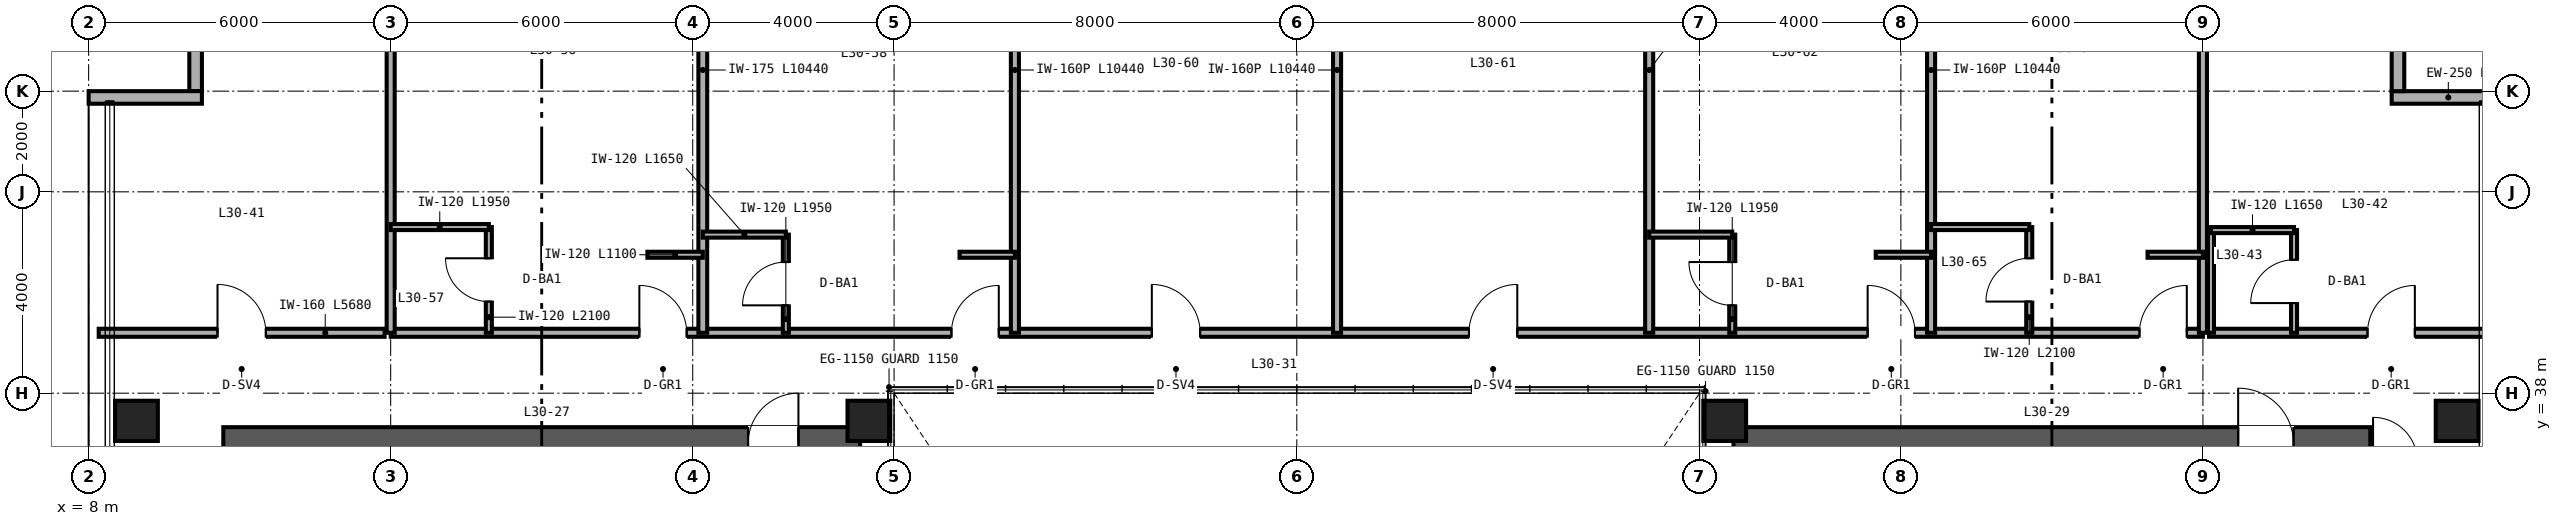
"""IFC4 building model, lengths in metres.
Left out: names, types, materials, properties, quantities, classifications, styles, units other than length and angle.
Written with IfcOpenShell. Run it as: python <this file> out.ifc"""

import sys

from ifc_helpers import new_model, si_unit, direction, frame, frame_2d, origin, origin_2d, place, context, subcontext, project, spatial, rectangle, hollow_rectangle, extrude, source, transform, mapped, element, fill, save


model = new_model("IFC4")
c1 = context("Model", 3, precision=1e-05, world=origin(), true_north=direction((0.0, 1.0)))
c2 = subcontext(c1, "Body", "Model", "MODEL_VIEW")
j1 = project(units=[si_unit("LENGTHUNIT", "METRE"), si_unit("PLANEANGLEUNIT", "RADIAN")], contexts=[c1])
p1 = place(None, origin())
s1 = spatial("IfcSite", under=j1, at=p1, CompositionType="ELEMENT")
p2 = place(p1, origin())
s2 = spatial("IfcBuilding", under=s1, at=p2, CompositionType="ELEMENT")
p3 = place(p2, frame((0.0, 0.0, 122.4)))
s3 = spatial("IfcBuildingStorey", under=s2, at=p3, CompositionType="ELEMENT", Elevation=122.4)
p4 = place(p3, frame((10.675, 37.0, 0.0), z_axis=(0.0, 0.0, 1.0), x_axis=(1.0, 0.0, 0.0)))
e1 = element("IfcWall", 1, at=p4, inside=s3, PredefinedType="SHEAR", context=c2, shape_type="SweptSolid", body=[
    extrude(rectangle(XDim=12.65, YDim=0.65, at=frame_2d((6.325, 0.0))), origin(), (0.0, 0.0, 1.0), 3.36),
])
p5 = place(p4, frame((10.425, 0.0, 0.0)))
e2 = element("IfcOpeningElement", 2, at=p5, cuts=e1, PredefinedType="OPENING", context=c2, shape_type="SweptSolid", body=[
    extrude(rectangle(XDim=1.0, YDim=2.15, at=frame_2d((0.5, 1.075))), frame((0.0, 0.335, 0.0), z_axis=(0.0, -1.0, 0.0), x_axis=(1.0, 0.0, 0.0)), (0.0, 0.0, 1.0), 0.67),
])
p6 = place(p3, frame((40.675, 37.0, 0.0), z_axis=(0.0, 0.0, 1.0), x_axis=(1.0, 0.0, 0.0)))
e3 = element("IfcWall", 3, at=p6, inside=s3, PredefinedType="SHEAR", context=c2, shape_type="SweptSolid", body=[
    extrude(rectangle(XDim=12.65, YDim=0.65, at=frame_2d((6.325, 0.0))), origin(), (0.0, 0.0, 1.0), 3.36),
])
p7 = place(p6, frame((10.025, 0.0, 0.0)))
e4 = element("IfcOpeningElement", 4, at=p7, cuts=e3, PredefinedType="OPENING", context=c2, shape_type="SweptSolid", body=[
    extrude(rectangle(XDim=1.1, YDim=2.15, at=frame_2d((0.55, 1.075))), frame((0.0, 0.335, 0.0), z_axis=(0.0, -1.0, 0.0), x_axis=(1.0, 0.0, 0.0)), (0.0, 0.0, 1.0), 0.67),
])
m1 = source(origin(), c2, "Body", "SweptSolid", [
    extrude(hollow_rectangle(XDim=0.85, YDim=0.8, WallThickness=0.032, at=origin_2d()), origin(), (0.0, 0.0, 1.0), 3.36),
])
for number, where, z_axis, x_axis in (
    (5, (8.95, 37.45, 0.0), (0.0, 0.0, 1.0), (1.0, 0.0, 0.0)),
    (6, (23.5, 37.45, 0.0), (0.0, 0.0, 1.0), (1.0, 0.0, 0.0)),
    (7, (40.5, 37.45, 0.0), (0.0, 0.0, 1.0), (1.0, 0.0, 0.0)),
    (8, (55.05, 37.45, 0.0), (0.0, 0.0, 1.0), (1.0, 0.0, 0.0)),
):
    element("IfcColumn", number, at=place(p3, frame(where, z_axis=z_axis, x_axis=x_axis)), inside=s3, PredefinedType="COLUMN", context=c2, shape_type="MappedRepresentation", body=[
        mapped(m1, transform((0.0, 0.0, 0.0), scale=1.0)),
    ])
p8 = place(p3, frame((56.0, 43.875, 0.0), z_axis=(0.0, 0.0, 1.0), x_axis=(-1.0, 0.0, 0.0)))
e9 = element("IfcWall", 9, at=p8, inside=s3, PredefinedType="SOLIDWALL", context=c2, shape_type="SweptSolid", body=[
    extrude(rectangle(XDim=2.25, YDim=0.25, at=frame_2d((1.125, 0.0))), origin(), (0.0, 0.0, 1.0), 3.36),
])
for number, where, z_axis, x_axis in (
    (10, (53.875, 44.0, 0.0), (0.0, 0.0, 1.0), (0.0, 1.0, 0.0)),
    (11, (10.125, 46.0, 0.0), (0.0, 0.0, 1.0), (0.0, -1.0, 0.0)),
):
    element("IfcWall", number, at=place(p3, frame(where, z_axis=z_axis, x_axis=x_axis)), inside=s3, PredefinedType="SOLIDWALL", context=c2, shape_type="SweptSolid", body=[
        extrude(rectangle(XDim=2.0, YDim=0.25, at=frame_2d((1.0, 0.0))), origin(), (0.0, 0.0, 1.0), 3.36),
    ])
p9 = place(p3, frame((10.25, 43.875, 0.0), z_axis=(0.0, 0.0, 1.0), x_axis=(-1.0, 0.0, 0.0)))
e12 = element("IfcWall", 12, at=p9, inside=s3, PredefinedType="SOLIDWALL", context=c2, shape_type="SweptSolid", body=[
    extrude(rectangle(XDim=2.25, YDim=0.25, at=frame_2d((1.125, 0.0))), origin(), (0.0, 0.0, 1.0), 3.36),
])
p10 = place(p3, frame((8.2, 39.2, 0.0), z_axis=(0.0, 0.0, 1.0), x_axis=(1.0, 0.0, 0.0)))
e13 = element("IfcWall", 13, at=p10, inside=s3, PredefinedType="PARTITIONING", context=c2, shape_type="SweptSolid", body=[
    extrude(rectangle(XDim=5.68, YDim=0.16, at=frame_2d((2.84, 0.0))), origin(), (0.0, 0.0, 1.0), 3.36),
])
p11 = place(p10, frame((2.36, 0.0, 0.0)))
e14 = element("IfcOpeningElement", 14, at=p11, cuts=e13, PredefinedType="OPENING", context=c2, shape_type="SweptSolid", body=[
    extrude(rectangle(XDim=0.96, YDim=2.15, at=frame_2d((0.48, 1.075))), frame((0.0, 0.09, 0.0), z_axis=(0.0, -1.0, 0.0), x_axis=(1.0, 0.0, 0.0)), (0.0, 0.0, 1.0), 0.18),
])
p12 = place(p3, frame((50.12, 39.2, 0.0), z_axis=(0.0, 0.0, 1.0), x_axis=(1.0, 0.0, 0.0)))
e15 = element("IfcWall", 15, at=p12, inside=s3, PredefinedType="PARTITIONING", context=c2, shape_type="SweptSolid", body=[
    extrude(rectangle(XDim=5.68, YDim=0.16, at=frame_2d((2.84, 0.0))), origin(), (0.0, 0.0, 1.0), 3.36),
])
p13 = place(p12, frame((3.15, 0.0, 0.0)))
e16 = element("IfcOpeningElement", 16, at=p13, cuts=e15, PredefinedType="OPENING", context=c2, shape_type="SweptSolid", body=[
    extrude(rectangle(XDim=0.94, YDim=2.15, at=frame_2d((0.47, 1.075))), frame((0.0, 0.09, 0.0), z_axis=(0.0, -1.0, 0.0), x_axis=(1.0, 0.0, 0.0)), (0.0, 0.0, 1.0), 0.18),
])
p14 = place(p3, frame((51.81, 39.2, 0.0), z_axis=(0.0, 0.0, 1.0), x_axis=(0.0, 1.0, 0.0)))
e17 = element("IfcWall", 17, at=p14, inside=s3, PredefinedType="PARTITIONING", context=c2, shape_type="SweptSolid", body=[
    extrude(rectangle(XDim=2.04, YDim=0.12, at=frame_2d((1.02, 0.0))), origin(), (0.0, 0.0, 1.0), 3.36),
])
p15 = place(p14, frame((0.59, 0.0, 0.0)))
e18 = element("IfcOpeningElement", 18, at=p15, cuts=e17, PredefinedType="OPENING", context=c2, shape_type="SweptSolid", body=[
    extrude(rectangle(XDim=0.86, YDim=2.1, at=frame_2d((0.43, 1.05))), frame((0.0, 0.07, 0.0), z_axis=(0.0, -1.0, 0.0), x_axis=(1.0, 0.0, 0.0)), (0.0, 0.0, 1.0), 0.14),
])
p16 = place(p3, frame((50.16, 39.2, 0.0), z_axis=(0.0, 0.0, 1.0), x_axis=(0.0, 1.0, 0.0)))
e19 = element("IfcWall", 19, at=p16, inside=s3, PredefinedType="PARTITIONING", context=c2, shape_type="SweptSolid", body=[
    extrude(rectangle(XDim=2.04, YDim=0.12, at=frame_2d((1.02, 0.0))), origin(), (0.0, 0.0, 1.0), 3.36),
])
p17 = place(p3, frame((50.16, 41.24, 0.0), z_axis=(0.0, 0.0, 1.0), x_axis=(1.0, 0.0, 0.0)))
e20 = element("IfcWall", 20, at=p17, inside=s3, PredefinedType="PARTITIONING", context=c2, shape_type="SweptSolid", body=[
    extrude(rectangle(XDim=1.65, YDim=0.12, at=frame_2d((0.825, 0.0))), origin(), (0.0, 0.0, 1.0), 3.36),
])
p18 = place(p3, frame((14.0, 39.2, 0.0), z_axis=(0.0, 0.0, 1.0), x_axis=(1.0, 0.0, 0.0)))
e21 = element("IfcWall", 21, at=p18, inside=s3, PredefinedType="PARTITIONING", context=c2, shape_type="SweptSolid", body=[
    extrude(rectangle(XDim=36.0, YDim=0.16, at=frame_2d((18.0, 0.0))), origin(), (0.0, 0.0, 1.0), 2.581),
])
p19 = place(p18, frame((4.94, 0.0, 0.0)))
e22 = element("IfcOpeningElement", 22, at=p19, cuts=e21, PredefinedType="OPENING", context=c2, shape_type="SweptSolid", body=[
    extrude(rectangle(XDim=0.94, YDim=2.15, at=frame_2d((0.47, 1.075))), frame((0.0, 0.09, 0.0), z_axis=(0.0, -1.0, 0.0), x_axis=(1.0, 0.0, 0.0)), (0.0, 0.0, 1.0), 0.18),
])
p20 = place(p18, frame((11.14, 0.0, 0.0)))
e23 = element("IfcOpeningElement", 23, at=p20, cuts=e21, PredefinedType="OPENING", context=c2, shape_type="SweptSolid", body=[
    extrude(rectangle(XDim=0.94, YDim=2.15, at=frame_2d((0.47, 1.075))), frame((0.0, 0.09, 0.0), z_axis=(0.0, -1.0, 0.0), x_axis=(1.0, 0.0, 0.0)), (0.0, 0.0, 1.0), 0.18),
])
p21 = place(p18, frame((15.12, 0.0, 0.0)))
e24 = element("IfcOpeningElement", 24, at=p21, cuts=e21, PredefinedType="OPENING", context=c2, shape_type="SweptSolid", body=[
    extrude(rectangle(XDim=0.96, YDim=2.15, at=frame_2d((0.48, 1.075))), frame((0.0, 0.09, 0.0), z_axis=(0.0, -1.0, 0.0), x_axis=(1.0, 0.0, 0.0)), (0.0, 0.0, 1.0), 0.18),
])
p22 = place(p18, frame((21.42, 0.0, 0.0)))
e25 = element("IfcOpeningElement", 25, at=p22, cuts=e21, PredefinedType="OPENING", context=c2, shape_type="SweptSolid", body=[
    extrude(rectangle(XDim=0.96, YDim=2.15, at=frame_2d((0.48, 1.075))), frame((0.0, 0.09, 0.0), z_axis=(0.0, -1.0, 0.0), x_axis=(1.0, 0.0, 0.0)), (0.0, 0.0, 1.0), 0.18),
])
p23 = place(p18, frame((29.34, 0.0, 0.0)))
e26 = element("IfcOpeningElement", 26, at=p23, cuts=e21, PredefinedType="OPENING", context=c2, shape_type="SweptSolid", body=[
    extrude(rectangle(XDim=0.94, YDim=2.15, at=frame_2d((0.47, 1.075))), frame((0.0, 0.09, 0.0), z_axis=(0.0, -1.0, 0.0), x_axis=(1.0, 0.0, 0.0)), (0.0, 0.0, 1.0), 0.18),
])
p24 = place(p18, frame((34.74, 0.0, 0.0)))
e27 = element("IfcOpeningElement", 27, at=p24, cuts=e21, PredefinedType="OPENING", context=c2, shape_type="SweptSolid", body=[
    extrude(rectangle(XDim=0.94, YDim=2.15, at=frame_2d((0.47, 1.075))), frame((0.0, 0.09, 0.0), z_axis=(0.0, -1.0, 0.0), x_axis=(1.0, 0.0, 0.0)), (0.0, 0.0, 1.0), 0.18),
])
for number, where, z_axis, x_axis in (
    (28, (14.0, 39.2, 0.0), (0.0, 0.0, 1.0), (0.0, 1.0, 0.0)),
    (29, (50.0, 39.2, 0.0), (0.0, 0.0, 1.0), (0.0, 1.0, 0.0)),
):
    element("IfcWall", number, at=place(p3, frame(where, z_axis=z_axis, x_axis=x_axis)), inside=s3, PredefinedType="PARTITIONING", context=c2, shape_type="SweptSolid", body=[
        extrude(rectangle(XDim=10.44, YDim=0.16, at=frame_2d((5.22, 0.0))), origin(), (0.0, 0.0, 1.0), 2.667),
    ])
p25 = place(p3, frame((20.2, 39.2, 0.0), z_axis=(0.0, 0.0, 1.0), x_axis=(0.0, 1.0, 0.0)))
e30 = element("IfcWall", 30, at=p25, inside=s3, PredefinedType="PARTITIONING", context=c2, shape_type="SweptSolid", body=[
    extrude(rectangle(XDim=10.44, YDim=0.175, at=frame_2d((5.22, 0.0))), origin(), (0.0, 0.0, 1.0), 2.667),
])
p26 = place(p3, frame((15.95, 39.2, 0.0), z_axis=(0.0, 0.0, 1.0), x_axis=(0.0, 1.0, 0.0)))
e31 = element("IfcWall", 31, at=p26, inside=s3, PredefinedType="PARTITIONING", context=c2, shape_type="SweptSolid", body=[
    extrude(rectangle(XDim=2.1, YDim=0.12, at=frame_2d((1.05, 0.0))), origin(), (0.0, 0.0, 1.0), 3.36),
])
p27 = place(p26, frame((0.62, 0.0, 0.0)))
e32 = element("IfcOpeningElement", 32, at=p27, cuts=e31, PredefinedType="OPENING", context=c2, shape_type="SweptSolid", body=[
    extrude(rectangle(XDim=0.86, YDim=2.1, at=frame_2d((0.43, 1.05))), frame((0.0, 0.07, 0.0), z_axis=(0.0, -1.0, 0.0), x_axis=(1.0, 0.0, 0.0)), (0.0, 0.0, 1.0), 0.14),
])
p28 = place(p3, frame((14.0, 41.3, 0.0), z_axis=(0.0, 0.0, 1.0), x_axis=(1.0, 0.0, 0.0)))
e33 = element("IfcWall", 33, at=p28, inside=s3, PredefinedType="PARTITIONING", context=c2, shape_type="SweptSolid", body=[
    extrude(rectangle(XDim=1.95, YDim=0.12, at=frame_2d((0.975, 0.0))), origin(), (0.0, 0.0, 1.0), 3.36),
])
p29 = place(p3, frame((19.1, 40.75, 0.0), z_axis=(0.0, 0.0, 1.0), x_axis=(1.0, 0.0, 0.0)))
e34 = element("IfcWall", 34, at=p29, inside=s3, PredefinedType="PARTITIONING", context=c2, shape_type="SweptSolid", body=[
    extrude(rectangle(XDim=1.1, YDim=0.12, at=frame_2d((0.55, 0.0))), origin(), (0.0, 0.0, 1.0), 3.36),
])
p30 = place(p3, frame((26.4, 39.2, 0.0), z_axis=(0.0, 0.0, 1.0), x_axis=(0.0, 1.0, 0.0)))
e35 = element("IfcWall", 35, at=p30, inside=s3, PredefinedType="PARTITIONING", context=c2, shape_type="SweptSolid", body=[
    extrude(rectangle(XDim=10.44, YDim=0.16, at=frame_2d((5.22, 0.0))), origin(), (0.0, 0.0, 1.0), 2.433),
])
p31 = place(p3, frame((21.85, 39.2, 0.0), z_axis=(0.0, 0.0, 1.0), x_axis=(0.0, 1.0, 0.0)))
e36 = element("IfcWall", 36, at=p31, inside=s3, PredefinedType="PARTITIONING", context=c2, shape_type="SweptSolid", body=[
    extrude(rectangle(XDim=1.95, YDim=0.12, at=frame_2d((0.975, 0.0))), origin(), (0.0, 0.0, 1.0), 3.36),
])
p32 = place(p31, frame((0.545, 0.0, 0.0)))
e37 = element("IfcOpeningElement", 37, at=p32, cuts=e36, PredefinedType="OPENING", context=c2, shape_type="SweptSolid", body=[
    extrude(rectangle(XDim=0.86, YDim=2.1, at=frame_2d((0.43, 1.05))), frame((0.0, 0.07, 0.0), z_axis=(0.0, -1.0, 0.0), x_axis=(1.0, 0.0, 0.0)), (0.0, 0.0, 1.0), 0.14),
])
p33 = place(p3, frame((20.2, 41.15, 0.0), z_axis=(0.0, 0.0, 1.0), x_axis=(1.0, 0.0, 0.0)))
e38 = element("IfcWall", 38, at=p33, inside=s3, PredefinedType="PARTITIONING", context=c2, shape_type="SweptSolid", body=[
    extrude(rectangle(XDim=1.65, YDim=0.12, at=frame_2d((0.825, 0.0))), origin(), (0.0, 0.0, 1.0), 3.36),
])
p34 = place(p3, frame((25.3, 40.75, 0.0), z_axis=(0.0, 0.0, 1.0), x_axis=(1.0, 0.0, 0.0)))
e39 = element("IfcWall", 39, at=p34, inside=s3, PredefinedType="PARTITIONING", context=c2, shape_type="SweptSolid", body=[
    extrude(rectangle(XDim=1.1, YDim=0.12, at=frame_2d((0.55, 0.0))), origin(), (0.0, 0.0, 1.0), 3.36),
])
for number, where, z_axis, x_axis in (
    (40, (32.8, 39.2, 0.0), (0.0, 0.0, 1.0), (0.0, 1.0, 0.0)),
    (41, (39.0, 39.2, 0.0), (0.0, 0.0, 1.0), (0.0, 1.0, 0.0)),
):
    element("IfcWall", number, at=place(p3, frame(where, z_axis=z_axis, x_axis=x_axis)), inside=s3, PredefinedType="PARTITIONING", context=c2, shape_type="SweptSolid", body=[
        extrude(rectangle(XDim=10.44, YDim=0.16, at=frame_2d((5.22, 0.0))), origin(), (0.0, 0.0, 1.0), 2.433),
    ])
p35 = place(p3, frame((44.6, 39.2, 0.0), z_axis=(0.0, 0.0, 1.0), x_axis=(0.0, 1.0, 0.0)))
e42 = element("IfcWall", 42, at=p35, inside=s3, PredefinedType="PARTITIONING", context=c2, shape_type="SweptSolid", body=[
    extrude(rectangle(XDim=10.44, YDim=0.16, at=frame_2d((5.22, 0.0))), origin(), (0.0, 0.0, 1.0), 2.667),
])
p36 = place(p3, frame((40.65, 39.2, 0.0), z_axis=(0.0, 0.0, 1.0), x_axis=(0.0, 1.0, 0.0)))
e43 = element("IfcWall", 43, at=p36, inside=s3, PredefinedType="PARTITIONING", context=c2, shape_type="SweptSolid", body=[
    extrude(rectangle(XDim=1.95, YDim=0.12, at=frame_2d((0.975, 0.0))), origin(), (0.0, 0.0, 1.0), 2.581),
])
p37 = place(p36, frame((0.545, 0.0, 0.0)))
e44 = element("IfcOpeningElement", 44, at=p37, cuts=e43, PredefinedType="OPENING", context=c2, shape_type="SweptSolid", body=[
    extrude(rectangle(XDim=0.86, YDim=2.1, at=frame_2d((0.43, 1.05))), frame((0.0, 0.07, 0.0), z_axis=(0.0, -1.0, 0.0), x_axis=(1.0, 0.0, 0.0)), (0.0, 0.0, 1.0), 0.14),
])
p38 = place(p3, frame((39.0, 41.15, 0.0), z_axis=(0.0, 0.0, 1.0), x_axis=(1.0, 0.0, 0.0)))
e45 = element("IfcWall", 45, at=p38, inside=s3, PredefinedType="PARTITIONING", context=c2, shape_type="SweptSolid", body=[
    extrude(rectangle(XDim=1.65, YDim=0.12, at=frame_2d((0.825, 0.0))), origin(), (0.0, 0.0, 1.0), 2.581),
])
p39 = place(p3, frame((43.5, 40.75, 0.0), z_axis=(0.0, 0.0, 1.0), x_axis=(1.0, 0.0, 0.0)))
e46 = element("IfcWall", 46, at=p39, inside=s3, PredefinedType="PARTITIONING", context=c2, shape_type="SweptSolid", body=[
    extrude(rectangle(XDim=1.1, YDim=0.12, at=frame_2d((0.55, 0.0))), origin(), (0.0, 0.0, 1.0), 3.36),
])
p40 = place(p3, frame((46.55, 39.2, 0.0), z_axis=(0.0, 0.0, 1.0), x_axis=(0.0, 1.0, 0.0)))
e47 = element("IfcWall", 47, at=p40, inside=s3, PredefinedType="PARTITIONING", context=c2, shape_type="SweptSolid", body=[
    extrude(rectangle(XDim=2.1, YDim=0.12, at=frame_2d((1.05, 0.0))), origin(), (0.0, 0.0, 1.0), 3.36),
])
p41 = place(p40, frame((0.62, 0.0, 0.0)))
e48 = element("IfcOpeningElement", 48, at=p41, cuts=e47, PredefinedType="OPENING", context=c2, shape_type="SweptSolid", body=[
    extrude(rectangle(XDim=0.86, YDim=2.1, at=frame_2d((0.43, 1.05))), frame((0.0, 0.07, 0.0), z_axis=(0.0, -1.0, 0.0), x_axis=(1.0, 0.0, 0.0)), (0.0, 0.0, 1.0), 0.14),
])
p42 = place(p3, frame((44.6, 41.3, 0.0), z_axis=(0.0, 0.0, 1.0), x_axis=(1.0, 0.0, 0.0)))
e49 = element("IfcWall", 49, at=p42, inside=s3, PredefinedType="PARTITIONING", context=c2, shape_type="SweptSolid", body=[
    extrude(rectangle(XDim=1.95, YDim=0.12, at=frame_2d((0.975, 0.0))), origin(), (0.0, 0.0, 1.0), 3.36),
])
p43 = place(p3, frame((48.9, 40.75, 0.0), z_axis=(0.0, 0.0, 1.0), x_axis=(1.0, 0.0, 0.0)))
e50 = element("IfcWall", 50, at=p43, inside=s3, PredefinedType="PARTITIONING", context=c2, shape_type="SweptSolid", body=[
    extrude(rectangle(XDim=1.1, YDim=0.12, at=frame_2d((0.55, 0.0))), origin(), (0.0, 0.0, 1.0), 3.36),
])
m2 = source(origin(), c2, "Body", "SweptSolid", [
    extrude(rectangle(XDim=1.0, YDim=2.15, at=frame_2d((0.5, 1.075))), frame((0.0, 0.025, 0.0), z_axis=(0.0, -1.0, 0.0), x_axis=(1.0, 0.0, 0.0)), (0.0, 0.0, 1.0), 0.05),
])
p44 = place(p5, origin())
e51 = element("IfcDoor", 51, at=p44, inside=s3, OperationType="SINGLE_SWING_RIGHT", PredefinedType="DOOR", context=c2, shape_type="MappedRepresentation", body=[
    mapped(m2, transform((0.0, 0.0, 0.0), scale=1.0)),
])
fill(e2, e51)
m3 = source(origin(), c2, "Body", "SweptSolid", [
    extrude(rectangle(XDim=1.1, YDim=2.15, at=frame_2d((0.55, 1.075))), frame((0.0, 0.025, 0.0), z_axis=(0.0, -1.0, 0.0), x_axis=(1.0, 0.0, 0.0)), (0.0, 0.0, 1.0), 0.05),
])
p45 = place(p7, origin())
e52 = element("IfcDoor", 52, at=p45, inside=s3, OperationType="SINGLE_SWING_LEFT", PredefinedType="DOOR", context=c2, shape_type="MappedRepresentation", body=[
    mapped(m3, transform((0.0, 0.0, 0.0), scale=1.0)),
])
fill(e4, e52)
m4 = source(origin(), c2, "Body", "SweptSolid", [
    extrude(rectangle(XDim=0.96, YDim=2.15, at=frame_2d((0.48, 1.075))), frame((0.0, 0.025, 0.0), z_axis=(0.0, -1.0, 0.0), x_axis=(1.0, 0.0, 0.0)), (0.0, 0.0, 1.0), 0.05),
])
p46 = place(p11, origin())
e53 = element("IfcDoor", 53, at=p46, inside=s3, OperationType="SINGLE_SWING_LEFT", PredefinedType="DOOR", context=c2, shape_type="MappedRepresentation", body=[
    mapped(m4, transform((0.0, 0.0, 0.0), scale=1.0)),
])
fill(e14, e53)
m5 = source(origin(), c2, "Body", "SweptSolid", [
    extrude(rectangle(XDim=0.86, YDim=2.1, at=frame_2d((0.43, 1.05))), frame((0.0, 0.025, 0.0), z_axis=(0.0, -1.0, 0.0), x_axis=(1.0, 0.0, 0.0)), (0.0, 0.0, 1.0), 0.05),
])
p47 = place(p15, origin())
e54 = element("IfcDoor", 54, at=p47, inside=s3, OperationType="SINGLE_SWING_LEFT", PredefinedType="DOOR", context=c2, shape_type="MappedRepresentation", body=[
    mapped(m5, transform((0.0, 0.0, 0.0), scale=1.0)),
])
fill(e18, e54)
m6 = source(origin(), c2, "Body", "SweptSolid", [
    extrude(rectangle(XDim=0.94, YDim=2.15, at=frame_2d((0.47, 1.075))), frame((0.0, 0.025, 0.0), z_axis=(0.0, -1.0, 0.0), x_axis=(1.0, 0.0, 0.0)), (0.0, 0.0, 1.0), 0.05),
])
p48 = place(p13, origin())
e55 = element("IfcDoor", 55, at=p48, inside=s3, OperationType="SINGLE_SWING_RIGHT", PredefinedType="DOOR", context=c2, shape_type="MappedRepresentation", body=[
    mapped(m6, transform((0.0, 0.0, 0.0), scale=1.0)),
])
fill(e16, e55)
p49 = place(p27, origin())
e56 = element("IfcDoor", 56, at=p49, inside=s3, OperationType="SINGLE_SWING_RIGHT", PredefinedType="DOOR", context=c2, shape_type="MappedRepresentation", body=[
    mapped(m5, transform((0.0, 0.0, 0.0), scale=1.0)),
])
fill(e32, e56)
p50 = place(p32, origin())
e57 = element("IfcDoor", 57, at=p50, inside=s3, OperationType="SINGLE_SWING_LEFT", PredefinedType="DOOR", context=c2, shape_type="MappedRepresentation", body=[
    mapped(m5, transform((0.0, 0.0, 0.0), scale=1.0)),
])
fill(e37, e57)
p51 = place(p37, origin())
e58 = element("IfcDoor", 58, at=p51, inside=s3, OperationType="SINGLE_SWING_RIGHT", PredefinedType="DOOR", context=c2, shape_type="MappedRepresentation", body=[
    mapped(m5, transform((0.0, 0.0, 0.0), scale=1.0)),
])
fill(e44, e58)
p52 = place(p41, origin())
e59 = element("IfcDoor", 59, at=p52, inside=s3, OperationType="SINGLE_SWING_LEFT", PredefinedType="DOOR", context=c2, shape_type="MappedRepresentation", body=[
    mapped(m5, transform((0.0, 0.0, 0.0), scale=1.0)),
])
fill(e48, e59)
p53 = place(p19, origin())
e60 = element("IfcDoor", 60, at=p53, inside=s3, OperationType="SINGLE_SWING_LEFT", PredefinedType="DOOR", context=c2, shape_type="MappedRepresentation", body=[
    mapped(m6, transform((0.0, 0.0, 0.0), scale=1.0)),
])
fill(e22, e60)
p54 = place(p20, origin())
e61 = element("IfcDoor", 61, at=p54, inside=s3, OperationType="SINGLE_SWING_RIGHT", PredefinedType="DOOR", context=c2, shape_type="MappedRepresentation", body=[
    mapped(m6, transform((0.0, 0.0, 0.0), scale=1.0)),
])
fill(e23, e61)
p55 = place(p21, origin())
e62 = element("IfcDoor", 62, at=p55, inside=s3, OperationType="SINGLE_SWING_LEFT", PredefinedType="DOOR", context=c2, shape_type="MappedRepresentation", body=[
    mapped(m4, transform((0.0, 0.0, 0.0), scale=1.0)),
])
fill(e24, e62)
p56 = place(p22, origin())
e63 = element("IfcDoor", 63, at=p56, inside=s3, OperationType="SINGLE_SWING_RIGHT", PredefinedType="DOOR", context=c2, shape_type="MappedRepresentation", body=[
    mapped(m4, transform((0.0, 0.0, 0.0), scale=1.0)),
])
fill(e25, e63)
p57 = place(p23, origin())
e64 = element("IfcDoor", 64, at=p57, inside=s3, OperationType="SINGLE_SWING_LEFT", PredefinedType="DOOR", context=c2, shape_type="MappedRepresentation", body=[
    mapped(m6, transform((0.0, 0.0, 0.0), scale=1.0)),
])
fill(e26, e64)
p58 = place(p24, origin())
e65 = element("IfcDoor", 65, at=p58, inside=s3, OperationType="SINGLE_SWING_RIGHT", PredefinedType="DOOR", context=c2, shape_type="MappedRepresentation", body=[
    mapped(m6, transform((0.0, 0.0, 0.0), scale=1.0)),
])
fill(e27, e65)
save(model, sys.argv[1])
